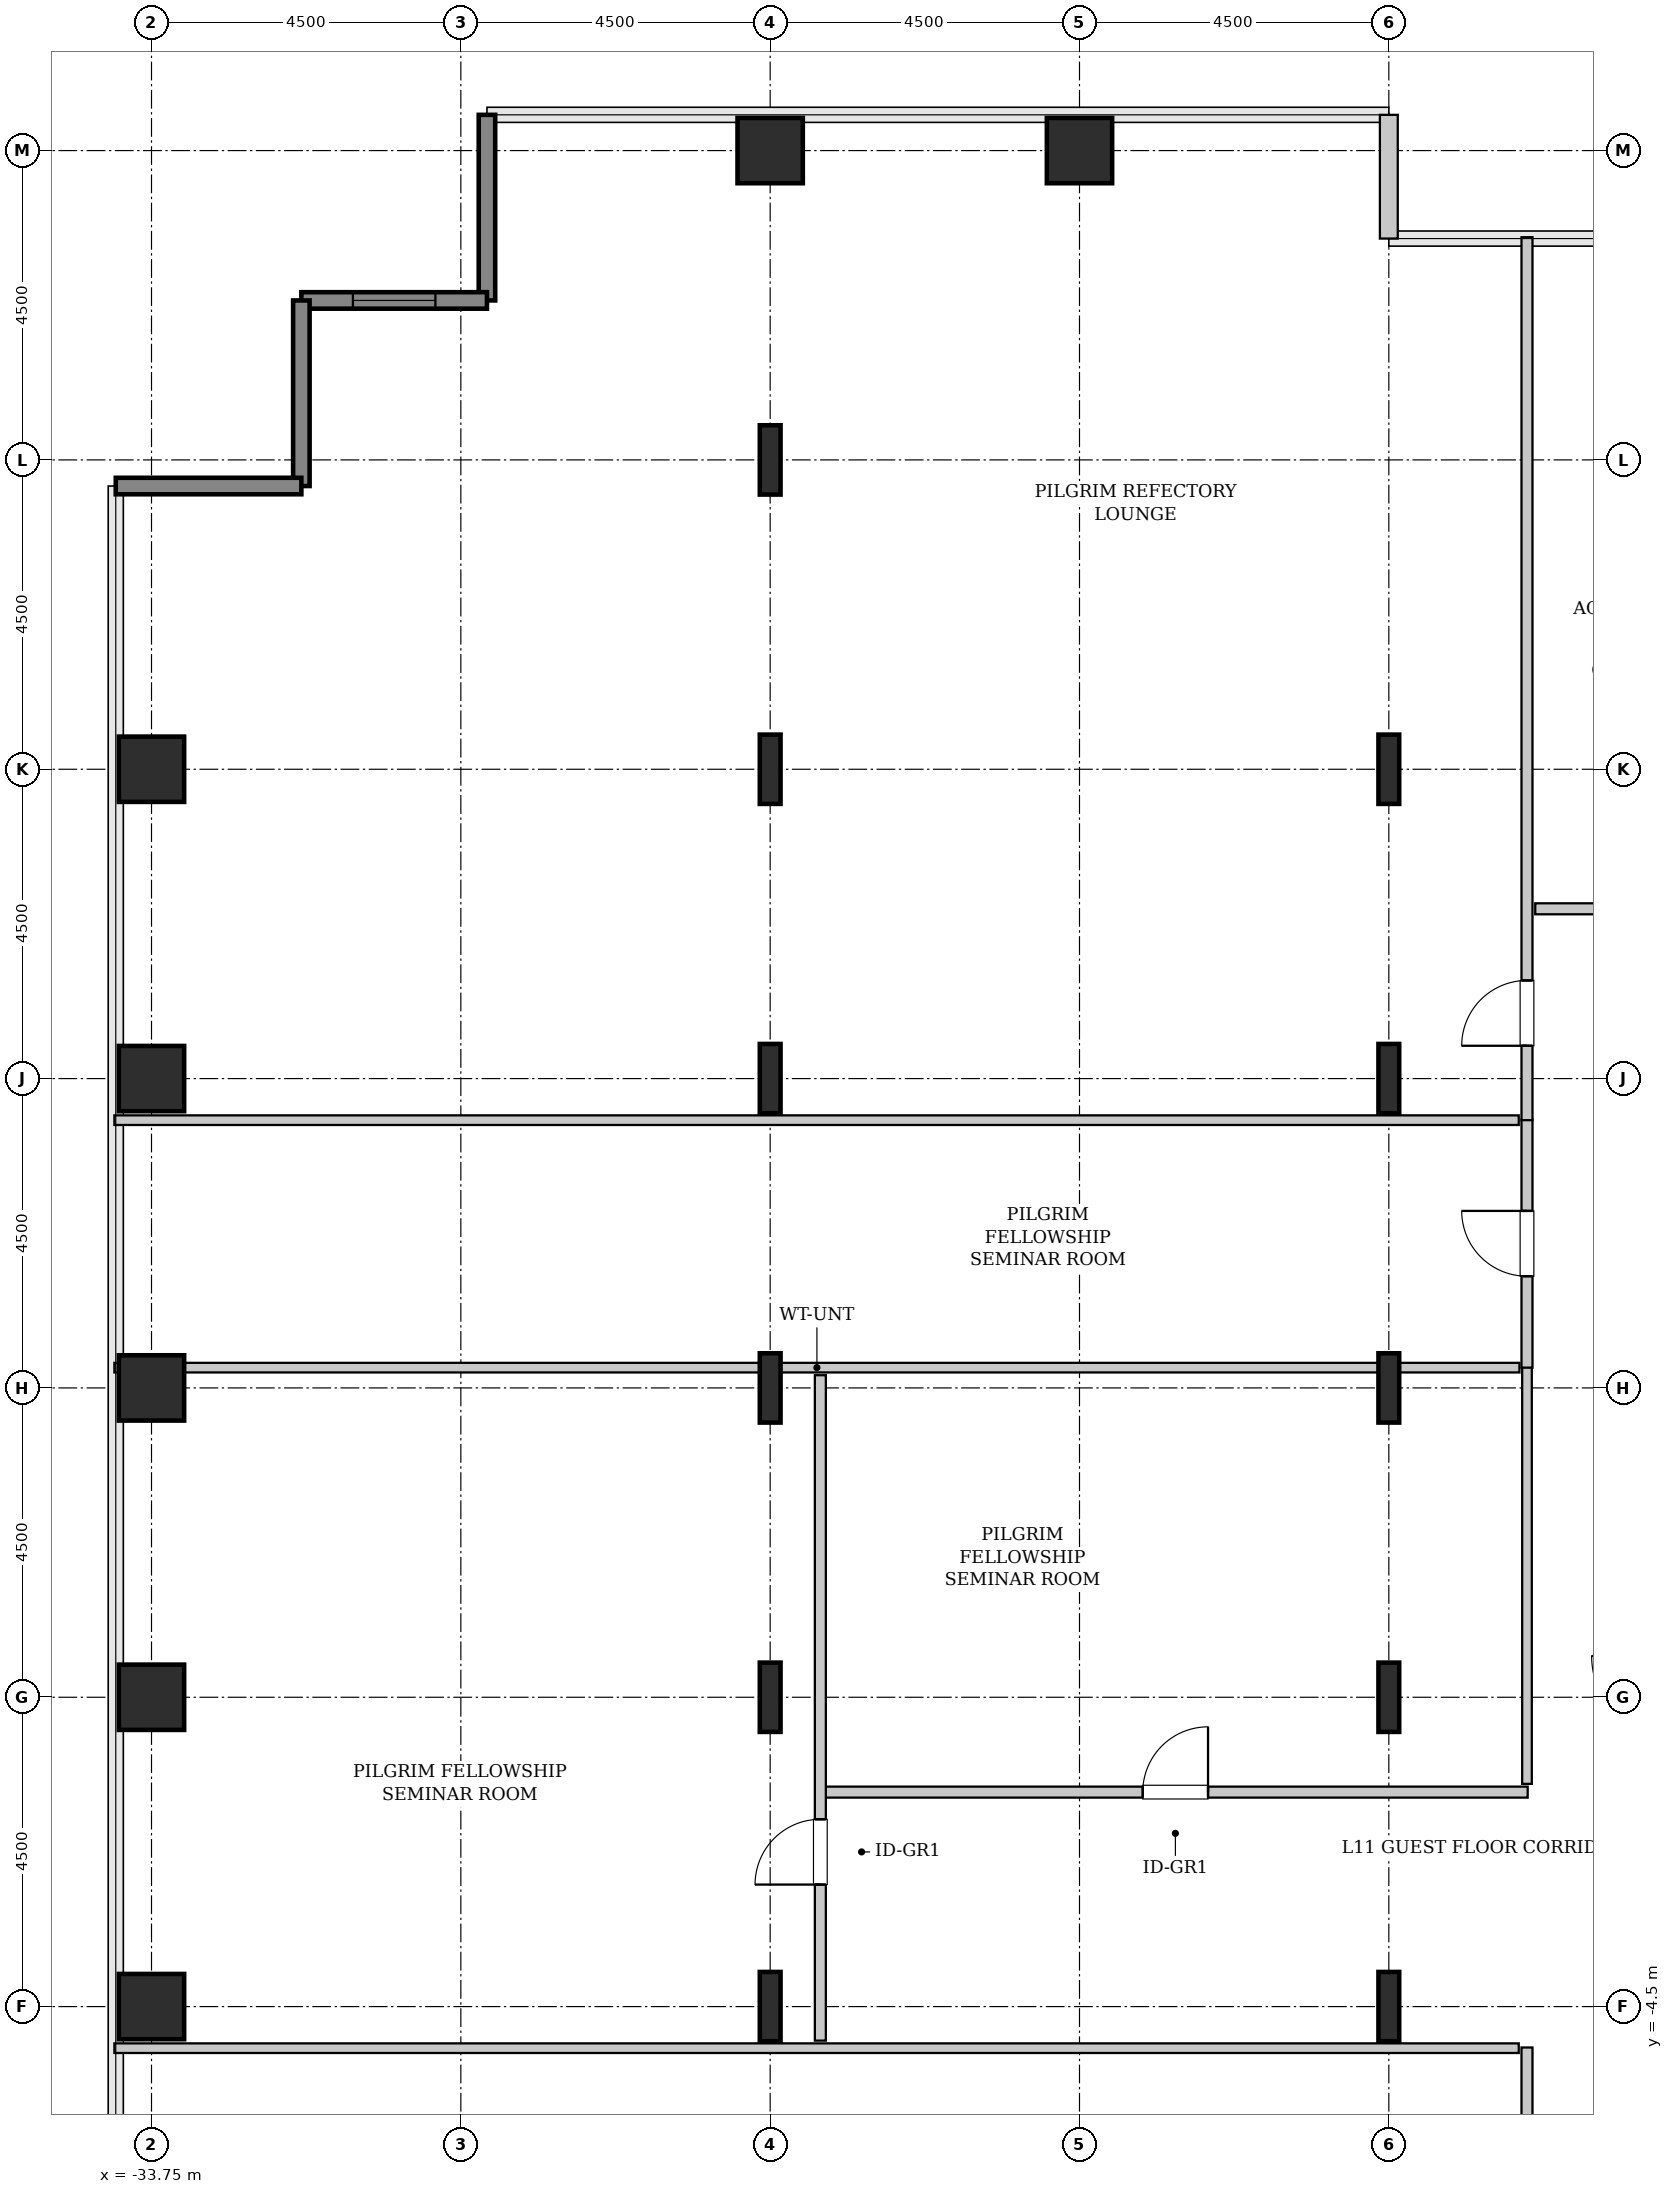
"""IFC4 building model, lengths in metres.
Left out: names, types, materials, properties, quantities, classifications, styles, units other than length and angle.
Written with IfcOpenShell. Run it as: python <this file> out.ifc"""

import sys

from ifc_helpers import new_model, si_unit, direction, frame, frame_2d, origin, origin_2d, place, context, subcontext, project, spatial, rectangle, hollow_rectangle, i_section, extrude, source, transform, mapped, element, fill, save


model = new_model("IFC4")
c1 = context("Model", 3, precision=1e-05, world=origin(), true_north=direction((0.0, 1.0)))
c2 = subcontext(c1, "Body", "Model", "MODEL_VIEW")
j1 = project(units=[si_unit("LENGTHUNIT", "METRE"), si_unit("PLANEANGLEUNIT", "RADIAN")], contexts=[c1])
p1 = place(None, origin())
s1 = spatial("IfcSite", under=j1, at=p1, CompositionType="ELEMENT")
p2 = place(p1, origin())
s2 = spatial("IfcBuilding", under=s1, at=p2, CompositionType="ELEMENT")
p3 = place(p2, frame((0.0, 0.0, 52.0)))
s3 = spatial("IfcBuildingStorey", under=s2, at=p3, CompositionType="ELEMENT", Elevation=52.0)
m1 = source(origin(), c2, "Body", "SweptSolid", [
    extrude(hollow_rectangle(XDim=0.95, YDim=0.95, WallThickness=0.045, InnerFilletRadius=0.045, OuterFilletRadius=0.09, at=origin_2d()), origin(), (0.0, 0.0, 1.0), 3.8),
])
for number, where, z_axis, x_axis in (
    (1, (-33.75, -4.5, 0.0), (0.0, 0.0, 1.0), (1.0, 0.0, 0.0)),
    (2, (-33.75, 0.0, 0.0), (0.0, 0.0, 1.0), (1.0, 0.0, 0.0)),
    (3, (-33.75, 4.5, 0.0), (0.0, 0.0, 1.0), (1.0, 0.0, 0.0)),
    (4, (-33.75, 9.0, 0.0), (0.0, 0.0, 1.0), (1.0, 0.0, 0.0)),
    (5, (-33.75, 13.5, 0.0), (0.0, 0.0, 1.0), (1.0, 0.0, 0.0)),
):
    element("IfcColumn", number, at=place(p3, frame(where, z_axis=z_axis, x_axis=x_axis)), inside=s3, PredefinedType="COLUMN", context=c2, shape_type="MappedRepresentation", body=[
        mapped(m1, transform((0.0, 0.0, 0.0), x_axis=(1.0, 0.0, 0.0), y_axis=(0.0, 1.0, 0.0), z_axis=(0.0, 0.0, 1.0), scale=1.0)),
    ])
m2 = source(origin(), c2, "Body", "SweptSolid", [
    extrude(i_section(OverallWidth=0.302, OverallDepth=1.008, WebThickness=0.021, FlangeThickness=0.04, FilletRadius=0.03, at=origin_2d()), origin(), (0.0, 0.0, 1.0), 3.8),
])
for number, where, z_axis, x_axis in (
    (6, (-24.75, -4.5, 0.0), (0.0, 0.0, 1.0), (1.0, 0.0, 0.0)),
    (7, (-24.75, 0.0, 0.0), (0.0, 0.0, 1.0), (1.0, 0.0, 0.0)),
    (8, (-24.75, 4.5, 0.0), (0.0, 0.0, 1.0), (1.0, 0.0, 0.0)),
    (9, (-24.75, 9.0, 0.0), (0.0, 0.0, 1.0), (1.0, 0.0, 0.0)),
    (10, (-24.75, 13.5, 0.0), (0.0, 0.0, 1.0), (1.0, 0.0, 0.0)),
    (11, (-24.75, 18.0, 0.0), (0.0, 0.0, 1.0), (1.0, 0.0, 0.0)),
):
    element("IfcColumn", number, at=place(p3, frame(where, z_axis=z_axis, x_axis=x_axis)), inside=s3, PredefinedType="COLUMN", context=c2, shape_type="MappedRepresentation", body=[
        mapped(m2, transform((0.0, 0.0, 0.0), x_axis=(1.0, 0.0, 0.0), y_axis=(0.0, 1.0, 0.0), z_axis=(0.0, 0.0, 1.0), scale=1.0)),
    ])
for number, where, z_axis, x_axis in (
    (12, (-24.75, 22.5, 0.0), (0.0, 0.0, 1.0), (1.0, 0.0, 0.0)),
    (13, (-20.25, 22.5, 0.0), (0.0, 0.0, 1.0), (1.0, 0.0, 0.0)),
):
    element("IfcColumn", number, at=place(p3, frame(where, z_axis=z_axis, x_axis=x_axis)), inside=s3, PredefinedType="COLUMN", context=c2, shape_type="MappedRepresentation", body=[
        mapped(m1, transform((0.0, 0.0, 0.0), x_axis=(1.0, 0.0, 0.0), y_axis=(0.0, 1.0, 0.0), z_axis=(0.0, 0.0, 1.0), scale=1.0)),
    ])
for number, where, z_axis, x_axis in (
    (14, (-15.75, -4.5, 0.0), (0.0, 0.0, 1.0), (1.0, 0.0, 0.0)),
    (15, (-15.75, 0.0, 0.0), (0.0, 0.0, 1.0), (1.0, 0.0, 0.0)),
    (16, (-15.75, 4.5, 0.0), (0.0, 0.0, 1.0), (1.0, 0.0, 0.0)),
    (17, (-15.75, 9.0, 0.0), (0.0, 0.0, 1.0), (1.0, 0.0, 0.0)),
    (18, (-15.75, 13.5, 0.0), (0.0, 0.0, 1.0), (1.0, 0.0, 0.0)),
):
    element("IfcColumn", number, at=place(p3, frame(where, z_axis=z_axis, x_axis=x_axis)), inside=s3, PredefinedType="COLUMN", context=c2, shape_type="MappedRepresentation", body=[
        mapped(m2, transform((0.0, 0.0, 0.0), x_axis=(1.0, 0.0, 0.0), y_axis=(0.0, 1.0, 0.0), z_axis=(0.0, 0.0, 1.0), scale=1.0)),
    ])
m3 = source(origin(), c2, "Body", "SweptSolid", [
    extrude(rectangle(XDim=1.8, YDim=0.26, at=frame_2d((0.9, 0.0))), origin(), (0.0, 0.0, 1.0), 3.55),
])
p4 = place(p3, frame((-15.75, 21.22, 0.0), z_axis=(0.0, 0.0, 1.0), x_axis=(0.0, 1.0, 0.0)))
e19 = element("IfcWall", 19, at=p4, inside=s3, PredefinedType="SOLIDWALL", context=c2, shape_type="MappedRepresentation", body=[
    mapped(m3, transform((0.0, 0.0, 0.0), x_axis=(1.0, 0.0, 0.0), y_axis=(0.0, 1.0, 0.0), z_axis=(0.0, 0.0, 1.0), scale=1.0)),
])
m4 = source(origin(), c2, "Body", "SweptSolid", [
    extrude(rectangle(XDim=2.7, YDim=0.24, at=frame_2d((1.35, 0.0))), origin(), (0.0, 0.0, 1.0), 3.55),
])
p5 = place(p3, frame((-28.87, 23.02, 0.0), z_axis=(0.0, 0.0, 1.0), x_axis=(0.0, -1.0, 0.0)))
e20 = element("IfcWall", 20, at=p5, inside=s3, PredefinedType="SHEAR", context=c2, shape_type="MappedRepresentation", body=[
    mapped(m4, transform((0.0, 0.0, 0.0), x_axis=(1.0, 0.0, 0.0), y_axis=(0.0, 1.0, 0.0), z_axis=(0.0, 0.0, 1.0), scale=1.0)),
])
p6 = place(p3, frame((-28.87, 20.32, 0.0), z_axis=(0.0, 0.0, 1.0), x_axis=(-1.0, 0.0, 0.0)))
e21 = element("IfcWall", 21, at=p6, inside=s3, PredefinedType="SHEAR", context=c2, shape_type="MappedRepresentation", body=[
    mapped(m4, transform((0.0, 0.0, 0.0), x_axis=(1.0, 0.0, 0.0), y_axis=(0.0, 1.0, 0.0), z_axis=(0.0, 0.0, 1.0), scale=1.0)),
])
p7 = place(p6, frame((0.75, 0.0, 0.85)))
e22 = element("IfcOpeningElement", 22, at=p7, cuts=e21, PredefinedType="OPENING", context=c2, shape_type="SweptSolid", body=[
    extrude(rectangle(XDim=1.2, YDim=1.8, at=frame_2d((0.6, 0.9))), frame((0.0, 0.13, 0.0), z_axis=(0.0, -1.0, 0.0), x_axis=(1.0, 0.0, 0.0)), (0.0, 0.0, 1.0), 0.26),
])
for number, where, z_axis, x_axis in (
    (23, (-31.57, 20.32, 0.0), (0.0, 0.0, 1.0), (0.0, -1.0, 0.0)),
    (24, (-31.57, 17.62, 0.0), (0.0, 0.0, 1.0), (-1.0, 0.0, 0.0)),
):
    element("IfcWall", number, at=place(p3, frame(where, z_axis=z_axis, x_axis=x_axis)), inside=s3, PredefinedType="SHEAR", context=c2, shape_type="MappedRepresentation", body=[
        mapped(m4, transform((0.0, 0.0, 0.0), x_axis=(1.0, 0.0, 0.0), y_axis=(0.0, 1.0, 0.0), z_axis=(0.0, 0.0, 1.0), scale=1.0)),
    ])
m5 = source(origin(), c2, "Body", "SweptSolid", [
    extrude(rectangle(XDim=3.41, YDim=0.16, at=frame_2d((1.705, 0.0))), origin(), (0.0, 0.0, 1.0), 3.535),
])
p8 = place(p3, frame((-13.74, -8.505, 0.0), z_axis=(0.0, 0.0, 1.0), x_axis=(0.0, 1.0, 0.0)))
e25 = element("IfcWall", 25, at=p8, inside=s3, PredefinedType="PARTITIONING", context=c2, shape_type="MappedRepresentation", body=[
    mapped(m5, transform((0.0, 0.0, 0.0), x_axis=(1.0, 0.0, 0.0), y_axis=(0.0, 1.0, 0.0), z_axis=(0.0, 0.0, 1.0), scale=1.0)),
])
p9 = place(p8, frame((1.23, 0.0, 0.0)))
e26 = element("IfcOpeningElement", 26, at=p9, cuts=e25, PredefinedType="OPENING", context=c2, shape_type="SweptSolid", body=[
    extrude(rectangle(XDim=0.95, YDim=2.1, at=frame_2d((0.475, 1.05))), frame((0.0, 0.09, 0.0), z_axis=(0.0, -1.0, 0.0), x_axis=(1.0, 0.0, 0.0)), (0.0, 0.0, 1.0), 0.18),
])
m6 = source(origin(), c2, "Body", "SweptSolid", [
    extrude(rectangle(XDim=20.43, YDim=0.14, at=frame_2d((10.215, 0.0))), origin(), (0.0, 0.0, 1.0), 3.535),
])
p10 = place(p3, frame((-34.29, -5.105, 0.0), z_axis=(0.0, 0.0, 1.0), x_axis=(1.0, 0.0, 0.0)))
e27 = element("IfcWall", 27, at=p10, inside=s3, PredefinedType="PARTITIONING", context=c2, shape_type="MappedRepresentation", body=[
    mapped(m6, transform((0.0, 0.0, 0.0), x_axis=(1.0, 0.0, 0.0), y_axis=(0.0, 1.0, 0.0), z_axis=(0.0, 0.0, 1.0), scale=1.0)),
])
m7 = source(origin(), c2, "Body", "SweptSolid", [
    extrude(rectangle(XDim=10.25, YDim=0.16, at=frame_2d((5.125, 0.0))), origin(), (0.0, 0.0, 1.0), 3.535),
])
p11 = place(p3, frame((-23.98, -1.38, 0.0), z_axis=(0.0, 0.0, 1.0), x_axis=(1.0, 0.0, 0.0)))
e28 = element("IfcWall", 28, at=p11, inside=s3, PredefinedType="PARTITIONING", context=c2, shape_type="MappedRepresentation", body=[
    mapped(m7, transform((0.0, 0.0, 0.0), x_axis=(1.0, 0.0, 0.0), y_axis=(0.0, 1.0, 0.0), z_axis=(0.0, 0.0, 1.0), scale=1.0)),
])
p12 = place(p11, frame((4.65, 0.0, 0.0)))
e29 = element("IfcOpeningElement", 29, at=p12, cuts=e28, PredefinedType="OPENING", context=c2, shape_type="SweptSolid", body=[
    extrude(rectangle(XDim=0.95, YDim=2.1, at=frame_2d((0.475, 1.05))), frame((0.0, 0.09, 0.0), z_axis=(0.0, -1.0, 0.0), x_axis=(1.0, 0.0, 0.0)), (0.0, 0.0, 1.0), 0.18),
])
m8 = source(origin(), c2, "Body", "SweptSolid", [
    extrude(rectangle(XDim=6.065, YDim=0.14, at=frame_2d((3.032, 0.0))), origin(), (0.0, 0.0, 1.0), 3.535),
])
p13 = place(p3, frame((-13.74, -1.26, 0.0), z_axis=(0.0, 0.0, 1.0), x_axis=(0.0, 1.0, 0.0)))
e30 = element("IfcWall", 30, at=p13, inside=s3, PredefinedType="PARTITIONING", context=c2, shape_type="MappedRepresentation", body=[
    mapped(m8, transform((0.0, 0.0, 0.0), x_axis=(1.0, 0.0, 0.0), y_axis=(0.0, 1.0, 0.0), z_axis=(0.0, 0.0, 1.0), scale=1.0)),
])
m9 = source(origin(), c2, "Body", "SweptSolid", [
    extrude(rectangle(XDim=20.44, YDim=0.14, at=frame_2d((10.22, 0.0))), origin(), (0.0, 0.0, 1.0), 2.825),
])
p14 = place(p3, frame((-34.29, 4.795, 0.0), z_axis=(0.0, 0.0, 1.0), x_axis=(1.0, 0.0, 0.0)))
e31 = element("IfcWall", 31, at=p14, inside=s3, PredefinedType="PARTITIONING", context=c2, shape_type="MappedRepresentation", body=[
    mapped(m9, transform((0.0, 0.0, 0.0), x_axis=(1.0, 0.0, 0.0), y_axis=(0.0, 1.0, 0.0), z_axis=(0.0, 0.0, 1.0), scale=1.0)),
])
m10 = source(origin(), c2, "Body", "SweptSolid", [
    extrude(rectangle(XDim=9.68, YDim=0.16, at=frame_2d((4.84, 0.0))), origin(), (0.0, 0.0, 1.0), 3.535),
])
p15 = place(p3, frame((-24.02, -4.995, 0.0), z_axis=(0.0, 0.0, 1.0), x_axis=(0.0, 1.0, 0.0)))
e32 = element("IfcWall", 32, at=p15, inside=s3, PredefinedType="PARTITIONING", context=c2, shape_type="MappedRepresentation", body=[
    mapped(m10, transform((0.0, 0.0, 0.0), x_axis=(1.0, 0.0, 0.0), y_axis=(0.0, 1.0, 0.0), z_axis=(0.0, 0.0, 1.0), scale=1.0)),
])
p16 = place(p15, frame((2.27, 0.0, 0.0)))
e33 = element("IfcOpeningElement", 33, at=p16, cuts=e32, PredefinedType="OPENING", context=c2, shape_type="SweptSolid", body=[
    extrude(rectangle(XDim=0.95, YDim=2.1, at=frame_2d((0.475, 1.05))), frame((0.0, 0.09, 0.0), z_axis=(0.0, -1.0, 0.0), x_axis=(1.0, 0.0, 0.0)), (0.0, 0.0, 1.0), 0.18),
])
m11 = source(origin(), c2, "Body", "SweptSolid", [
    extrude(rectangle(XDim=3.61, YDim=0.16, at=frame_2d((1.805, 0.0))), origin(), (0.0, 0.0, 1.0), 3.535),
])
p17 = place(p3, frame((-13.74, 4.795, 0.0), z_axis=(0.0, 0.0, 1.0), x_axis=(0.0, 1.0, 0.0)))
e34 = element("IfcWall", 34, at=p17, inside=s3, PredefinedType="PARTITIONING", context=c2, shape_type="MappedRepresentation", body=[
    mapped(m11, transform((0.0, 0.0, 0.0), x_axis=(1.0, 0.0, 0.0), y_axis=(0.0, 1.0, 0.0), z_axis=(0.0, 0.0, 1.0), scale=1.0)),
])
p18 = place(p17, frame((1.33, 0.0, 0.0)))
e35 = element("IfcOpeningElement", 35, at=p18, cuts=e34, PredefinedType="OPENING", context=c2, shape_type="SweptSolid", body=[
    extrude(rectangle(XDim=0.95, YDim=2.1, at=frame_2d((0.475, 1.05))), frame((0.0, 0.09, 0.0), z_axis=(0.0, -1.0, 0.0), x_axis=(1.0, 0.0, 0.0)), (0.0, 0.0, 1.0), 0.18),
])
p19 = place(p3, frame((-34.29, 8.395, 0.0), z_axis=(0.0, 0.0, 1.0), x_axis=(1.0, 0.0, 0.0)))
e36 = element("IfcWall", 36, at=p19, inside=s3, PredefinedType="PARTITIONING", context=c2, shape_type="MappedRepresentation", body=[
    mapped(m6, transform((0.0, 0.0, 0.0), x_axis=(1.0, 0.0, 0.0), y_axis=(0.0, 1.0, 0.0), z_axis=(0.0, 0.0, 1.0), scale=1.0)),
])
m12 = source(origin(), c2, "Body", "SweptSolid", [
    extrude(rectangle(XDim=12.845, YDim=0.16, at=frame_2d((6.422, 0.0))), origin(), (0.0, 0.0, 1.0), 3.535),
])
p20 = place(p3, frame((-13.74, 8.395, 0.0), z_axis=(0.0, 0.0, 1.0), x_axis=(0.0, 1.0, 0.0)))
e37 = element("IfcWall", 37, at=p20, inside=s3, PredefinedType="PARTITIONING", context=c2, shape_type="MappedRepresentation", body=[
    mapped(m12, transform((0.0, 0.0, 0.0), x_axis=(1.0, 0.0, 0.0), y_axis=(0.0, 1.0, 0.0), z_axis=(0.0, 0.0, 1.0), scale=1.0)),
])
p21 = place(p20, frame((1.083, 0.0, 0.0)))
e38 = element("IfcOpeningElement", 38, at=p21, cuts=e37, PredefinedType="OPENING", context=c2, shape_type="SweptSolid", body=[
    extrude(rectangle(XDim=0.95, YDim=2.1, at=frame_2d((0.475, 1.05))), frame((0.0, 0.09, 0.0), z_axis=(0.0, -1.0, 0.0), x_axis=(1.0, 0.0, 0.0)), (0.0, 0.0, 1.0), 0.18),
])
m13 = source(origin(), c2, "Body", "SweptSolid", [
    extrude(rectangle(XDim=4.125, YDim=0.16, at=frame_2d((2.062, 0.0))), origin(), (0.0, 0.0, 1.0), 3.535),
])
p22 = place(p3, frame((-13.62, 11.47, 0.0), z_axis=(0.0, 0.0, 1.0), x_axis=(1.0, 0.0, 0.0)))
e39 = element("IfcWall", 39, at=p22, inside=s3, PredefinedType="PARTITIONING", context=c2, shape_type="MappedRepresentation", body=[
    mapped(m13, transform((0.0, 0.0, 0.0), x_axis=(1.0, 0.0, 0.0), y_axis=(0.0, 1.0, 0.0), z_axis=(0.0, 0.0, 1.0), scale=1.0)),
])
p23 = place(p22, frame((1.587, 0.0, 0.0)))
e40 = element("IfcOpeningElement", 40, at=p23, cuts=e39, PredefinedType="OPENING", context=c2, shape_type="SweptSolid", body=[
    extrude(rectangle(XDim=0.95, YDim=2.1, at=frame_2d((0.475, 1.05))), frame((0.0, 0.09, 0.0), z_axis=(0.0, -1.0, 0.0), x_axis=(1.0, 0.0, 0.0)), (0.0, 0.0, 1.0), 0.18),
])
m14 = source(origin(), c2, "Body", "SweptSolid", [
    extrude(rectangle(XDim=1.2, YDim=1.8, at=frame_2d((0.6, 0.9))), frame((0.0, 0.03, 0.0), z_axis=(0.0, -1.0, 0.0), x_axis=(1.0, 0.0, 0.0)), (0.0, 0.0, 1.0), 0.06),
])
p24 = place(p7, origin())
e41 = element("IfcWindow", 41, at=p24, inside=s3, PartitioningType="SINGLE_PANEL", PredefinedType="WINDOW", context=c2, shape_type="MappedRepresentation", body=[
    mapped(m14, transform((0.0, 0.0, 0.0), x_axis=(1.0, 0.0, 0.0), y_axis=(0.0, 1.0, 0.0), z_axis=(0.0, 0.0, 1.0), scale=1.0)),
])
fill(e22, e41)
m15 = source(origin(), c2, "Body", "SweptSolid", [
    extrude(rectangle(XDim=0.95, YDim=2.1, at=frame_2d((0.475, 1.05))), frame((0.0, 0.025, 0.0), z_axis=(0.0, -1.0, 0.0), x_axis=(1.0, 0.0, 0.0)), (0.0, 0.0, 1.0), 0.05),
])
p25 = place(p12, origin())
e42 = element("IfcDoor", 42, at=p25, inside=s3, OperationType="SINGLE_SWING_RIGHT", PredefinedType="DOOR", context=c2, shape_type="MappedRepresentation", body=[
    mapped(m15, transform((0.0, 0.0, 0.0), x_axis=(1.0, 0.0, 0.0), y_axis=(0.0, 1.0, 0.0), z_axis=(0.0, 0.0, 1.0), scale=1.0)),
])
fill(e29, e42)
p26 = place(p16, origin())
e43 = element("IfcDoor", 43, at=p26, inside=s3, OperationType="SINGLE_SWING_LEFT", PredefinedType="DOOR", context=c2, shape_type="MappedRepresentation", body=[
    mapped(m15, transform((0.0, 0.0, 0.0), x_axis=(1.0, 0.0, 0.0), y_axis=(0.0, 1.0, 0.0), z_axis=(0.0, 0.0, 1.0), scale=1.0)),
])
fill(e33, e43)
p27 = place(p18, origin())
e44 = element("IfcDoor", 44, at=p27, inside=s3, OperationType="SINGLE_SWING_RIGHT", PredefinedType="DOOR", context=c2, shape_type="MappedRepresentation", body=[
    mapped(m15, transform((0.0, 0.0, 0.0), x_axis=(1.0, 0.0, 0.0), y_axis=(0.0, 1.0, 0.0), z_axis=(0.0, 0.0, 1.0), scale=1.0)),
])
fill(e35, e44)
p28 = place(p21, origin())
e45 = element("IfcDoor", 45, at=p28, inside=s3, OperationType="SINGLE_SWING_LEFT", PredefinedType="DOOR", context=c2, shape_type="MappedRepresentation", body=[
    mapped(m15, transform((0.0, 0.0, 0.0), x_axis=(1.0, 0.0, 0.0), y_axis=(0.0, 1.0, 0.0), z_axis=(0.0, 0.0, 1.0), scale=1.0)),
])
fill(e38, e45)
save(model, sys.argv[1])
